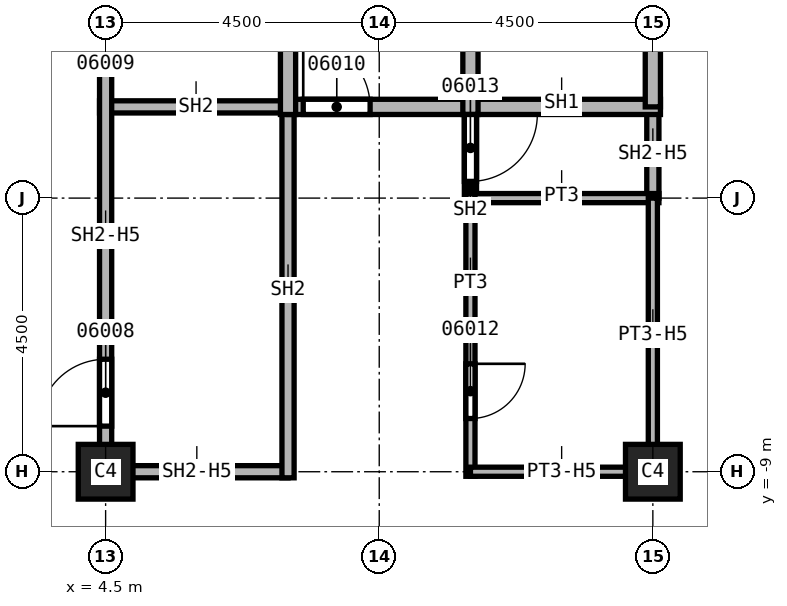
"""IFC4 building model, lengths in metres.
Left out: names, types, materials, properties, quantities, classifications, styles, units other than length and angle.
Written with IfcOpenShell. Run it as: python <this file> out.ifc"""

import sys

from ifc_helpers import new_model, si_unit, direction, frame, frame_2d, origin, origin_2d, place, context, subcontext, project, spatial, rectangle, extrude, element, fill, save


model = new_model("IFC4")
c1 = context("Model", 3, precision=1e-05, world=origin(), true_north=direction((0.0, 1.0)))
c2 = subcontext(c1, "Body", "Model", "MODEL_VIEW")
j1 = project(units=[si_unit("LENGTHUNIT", "METRE"), si_unit("PLANEANGLEUNIT", "RADIAN")], contexts=[c1])
p1 = place(None, origin())
s1 = spatial("IfcSite", under=j1, at=p1, CompositionType="ELEMENT")
p2 = place(p1, origin())
s2 = spatial("IfcBuilding", under=s1, at=p2, CompositionType="ELEMENT")
p3 = place(p2, frame((0.0, 0.0, 126.0)))
s3 = spatial("IfcBuildingStorey", under=s2, at=p3, CompositionType="ELEMENT", Elevation=126.0)
for number, where, z_axis, x_axis in (
    (1, (4.5, -9.0, 0.0), (0.0, 0.0, 1.0), (1.0, 0.0, 0.0)),
    (2, (13.5, -9.0, 0.0), (0.0, 0.0, 1.0), (1.0, 0.0, 0.0)),
):
    element("IfcColumn", number, at=place(p3, frame(where, z_axis=z_axis, x_axis=x_axis)), inside=s3, PredefinedType="COLUMN", context=c2, shape_type="SweptSolid", body=[
        extrude(rectangle(XDim=0.9, YDim=0.9, at=origin_2d()), origin(), (0.0, 0.0, 1.0), 3.7),
    ])
p4 = place(p3, frame((4.4, -3.0, 0.0), z_axis=(0.0, 0.0, 1.0), x_axis=(1.0, 0.0, 0.0)))
e3 = element("IfcWall", 3, at=p4, inside=s3, PredefinedType="SOLIDWALL", context=c2, shape_type="SweptSolid", body=[
    extrude(rectangle(XDim=3.225, YDim=0.2, at=frame_2d((1.613, 0.0))), origin(), (0.0, 0.0, 1.0), 3.7),
])
p5 = place(p3, frame((4.5, -9.1, 0.0), z_axis=(0.0, 0.0, 1.0), x_axis=(0.0, 1.0, 0.0)))
e4 = element("IfcWall", 4, at=p5, inside=s3, PredefinedType="SOLIDWALL", context=c2, shape_type="SweptSolid", body=[
    extrude(rectangle(XDim=9.1, YDim=0.2, at=frame_2d((4.55, 0.0))), origin(), (0.0, 0.0, 1.0), 2.938),
])
p6 = place(p5, frame((0.85, 0.0, 0.0)))
e5 = element("IfcOpeningElement", 5, at=p6, cuts=e4, PredefinedType="OPENING", context=c2, shape_type="SweptSolid", body=[
    extrude(rectangle(XDim=1.1, YDim=2.1, at=frame_2d((0.55, 1.05))), frame((0.0, 0.1, 0.0), z_axis=(0.0, -1.0, 0.0), x_axis=(1.0, 0.0, 0.0)), (0.0, 0.0, 1.0), 0.2),
])
p7 = place(p5, frame((7.25, 0.0, 0.0)))
e6 = element("IfcOpeningElement", 6, at=p7, cuts=e4, PredefinedType="OPENING", context=c2, shape_type="SweptSolid", body=[
    extrude(rectangle(XDim=1.1, YDim=2.1, at=frame_2d((0.55, 1.05))), frame((0.0, 0.1, 0.0), z_axis=(0.0, -1.0, 0.0), x_axis=(1.0, 0.0, 0.0)), (0.0, 0.0, 1.0), 0.2),
])
p8 = place(p3, frame((7.5, -9.0, 0.0), z_axis=(0.0, 0.0, 1.0), x_axis=(-1.0, 0.0, 0.0)))
e7 = element("IfcWall", 7, at=p8, inside=s3, PredefinedType="SOLIDWALL", context=c2, shape_type="SweptSolid", body=[
    extrude(rectangle(XDim=3.0, YDim=0.2, at=frame_2d((1.5, 0.0))), origin(), (0.0, 0.0, 1.0), 2.938),
])
p9 = place(p3, frame((7.5, -2.875, 0.0), z_axis=(0.0, 0.0, 1.0), x_axis=(0.0, -1.0, 0.0)))
e8 = element("IfcWall", 8, at=p9, inside=s3, PredefinedType="SOLIDWALL", context=c2, shape_type="SweptSolid", body=[
    extrude(rectangle(XDim=6.225, YDim=0.2, at=frame_2d((3.113, 0.0))), origin(), (0.0, 0.0, 1.0), 3.7),
])
p10 = place(p3, frame((10.5, -2.875, 0.0), z_axis=(0.0, 0.0, 1.0), x_axis=(0.0, -1.0, 0.0)))
e9 = element("IfcWall", 9, at=p10, inside=s3, PredefinedType="SOLIDWALL", context=c2, shape_type="SweptSolid", body=[
    extrude(rectangle(XDim=1.7, YDim=0.2, at=frame_2d((0.85, 0.0))), origin(), (0.0, 0.0, 1.0), 3.7),
])
p11 = place(p10, frame((0.25, 0.0, 0.0)))
e10 = element("IfcOpeningElement", 10, at=p11, cuts=e9, PredefinedType="OPENING", context=c2, shape_type="SweptSolid", body=[
    extrude(rectangle(XDim=1.1, YDim=2.1, at=frame_2d((0.55, 1.05))), frame((0.0, 0.1, 0.0), z_axis=(0.0, -1.0, 0.0), x_axis=(1.0, 0.0, 0.0)), (0.0, 0.0, 1.0), 0.2),
])
p12 = place(p3, frame((13.5, -3.0, 0.0), z_axis=(0.0, 0.0, 1.0), x_axis=(0.0, -1.0, 0.0)))
e11 = element("IfcWall", 11, at=p12, inside=s3, PredefinedType="SOLIDWALL", context=c2, shape_type="SweptSolid", body=[
    extrude(rectangle(XDim=1.5, YDim=0.2, at=frame_2d((0.75, 0.0))), origin(), (0.0, 0.0, 1.0), 2.938),
])
p13 = place(p3, frame((7.5, -3.0, 0.0), z_axis=(0.0, 0.0, 1.0), x_axis=(1.0, 0.0, 0.0)))
e12 = element("IfcWall", 12, at=p13, inside=s3, PredefinedType="SOLIDWALL", context=c2, shape_type="SweptSolid", body=[
    extrude(rectangle(XDim=6.125, YDim=0.25, at=frame_2d((3.062, 0.0))), origin(), (0.0, 0.0, 1.0), 3.7),
])
p14 = place(p13, frame((0.25, 0.0, 0.0)))
e13 = element("IfcOpeningElement", 13, at=p14, cuts=e12, PredefinedType="OPENING", context=c2, shape_type="SweptSolid", body=[
    extrude(rectangle(XDim=1.1, YDim=2.1, at=frame_2d((0.55, 1.05))), frame((0.0, 0.125, 0.0), z_axis=(0.0, -1.0, 0.0), x_axis=(1.0, 0.0, 0.0)), (0.0, 0.0, 1.0), 0.25),
])
p15 = place(p3, frame((7.5, 9.125, 0.0), z_axis=(0.0, 0.0, 1.0), x_axis=(0.0, -1.0, 0.0)))
e14 = element("IfcWall", 14, at=p15, inside=s3, PredefinedType="SOLIDWALL", context=c2, shape_type="SweptSolid", body=[
    extrude(rectangle(XDim=12.25, YDim=0.25, at=frame_2d((6.125, 0.0))), origin(), (0.0, 0.0, 1.0), 3.7),
])
p16 = place(p3, frame((10.5, 6.125, 0.0), z_axis=(0.0, 0.0, 1.0), x_axis=(0.0, -1.0, 0.0)))
e15 = element("IfcWall", 15, at=p16, inside=s3, PredefinedType="SOLIDWALL", context=c2, shape_type="SweptSolid", body=[
    extrude(rectangle(XDim=9.25, YDim=0.25, at=frame_2d((4.625, 0.0))), origin(), (0.0, 0.0, 1.0), 3.7),
])
p17 = place(p16, frame((7.075, 0.0, 0.0)))
e16 = element("IfcOpeningElement", 16, at=p17, cuts=e15, PredefinedType="OPENING", context=c2, shape_type="SweptSolid", body=[
    extrude(rectangle(XDim=1.1, YDim=2.1, at=frame_2d((0.55, 1.05))), frame((0.0, 0.125, 0.0), z_axis=(0.0, -1.0, 0.0), x_axis=(1.0, 0.0, 0.0)), (0.0, 0.0, 1.0), 0.25),
])
p18 = place(p16, frame((4.075, 0.0, 0.0)))
e17 = element("IfcOpeningElement", 17, at=p18, cuts=e15, PredefinedType="OPENING", context=c2, shape_type="SweptSolid", body=[
    extrude(rectangle(XDim=1.1, YDim=2.1, at=frame_2d((0.55, 1.05))), frame((0.0, 0.125, 0.0), z_axis=(0.0, -1.0, 0.0), x_axis=(1.0, 0.0, 0.0)), (0.0, 0.0, 1.0), 0.25),
])
p19 = place(p3, frame((13.5, 6.0, 0.0), z_axis=(0.0, 0.0, 1.0), x_axis=(0.0, -1.0, 0.0)))
e18 = element("IfcWall", 18, at=p19, inside=s3, PredefinedType="SOLIDWALL", context=c2, shape_type="SweptSolid", body=[
    extrude(rectangle(XDim=9.0, YDim=0.25, at=frame_2d((4.5, 0.0))), origin(), (0.0, 0.0, 1.0), 2.938),
])
p20 = place(p3, frame((10.5, -4.5, 0.0), z_axis=(0.0, 0.0, 1.0), x_axis=(1.0, 0.0, 0.0)))
e19 = element("IfcWall", 19, at=p20, inside=s3, PredefinedType="PARTITIONING", context=c2, shape_type="SweptSolid", body=[
    extrude(rectangle(XDim=3.1, YDim=0.15, at=frame_2d((1.55, 0.0))), origin(), (0.0, 0.0, 1.0), 3.7),
])
p21 = place(p3, frame((10.5, -4.425, 0.0), z_axis=(0.0, 0.0, 1.0), x_axis=(0.0, -1.0, 0.0)))
e20 = element("IfcWall", 20, at=p21, inside=s3, PredefinedType="PARTITIONING", context=c2, shape_type="SweptSolid", body=[
    extrude(rectangle(XDim=4.65, YDim=0.15, at=frame_2d((2.325, 0.0))), origin(), (0.0, 0.0, 1.0), 3.7),
])
p22 = place(p21, frame((2.8, 0.0, 0.0)))
e21 = element("IfcOpeningElement", 21, at=p22, cuts=e20, PredefinedType="OPENING", context=c2, shape_type="SweptSolid", body=[
    extrude(rectangle(XDim=0.9, YDim=2.1, at=frame_2d((0.45, 1.05))), frame((0.0, 0.075, 0.0), z_axis=(0.0, -1.0, 0.0), x_axis=(1.0, 0.0, 0.0)), (0.0, 0.0, 1.0), 0.15),
])
p23 = place(p3, frame((13.5, -9.0, 0.0), z_axis=(0.0, 0.0, 1.0), x_axis=(-1.0, 0.0, 0.0)))
e22 = element("IfcWall", 22, at=p23, inside=s3, PredefinedType="PARTITIONING", context=c2, shape_type="SweptSolid", body=[
    extrude(rectangle(XDim=3.0, YDim=0.15, at=frame_2d((1.5, 0.0))), origin(), (0.0, 0.0, 1.0), 2.938),
])
p24 = place(p3, frame((13.5, -4.5, 0.0), z_axis=(0.0, 0.0, 1.0), x_axis=(0.0, -1.0, 0.0)))
e23 = element("IfcWall", 23, at=p24, inside=s3, PredefinedType="PARTITIONING", context=c2, shape_type="SweptSolid", body=[
    extrude(rectangle(XDim=4.575, YDim=0.15, at=frame_2d((2.288, 0.0))), origin(), (0.0, 0.0, 1.0), 2.938),
])
p25 = place(p6, origin())
e24 = element("IfcDoor", 24, at=p25, inside=s3, OperationType="SINGLE_SWING_LEFT", PredefinedType="DOOR", context=c2, shape_type="SweptSolid", body=[
    extrude(rectangle(XDim=1.1, YDim=2.1, at=frame_2d((0.55, 1.05))), frame((0.0, 0.025, 0.0), z_axis=(0.0, -1.0, 0.0), x_axis=(1.0, 0.0, 0.0)), (0.0, 0.0, 1.0), 0.05),
])
fill(e5, e24)
p26 = place(p14, origin())
e25 = element("IfcDoor", 25, at=p26, inside=s3, OperationType="SINGLE_SWING_LEFT", PredefinedType="DOOR", context=c2, shape_type="SweptSolid", body=[
    extrude(rectangle(XDim=1.1, YDim=2.1, at=frame_2d((0.55, 1.05))), frame((0.0, 0.025, 0.0), z_axis=(0.0, -1.0, 0.0), x_axis=(1.0, 0.0, 0.0)), (0.0, 0.0, 1.0), 0.05),
])
fill(e13, e25)
p27 = place(p22, origin())
e26 = element("IfcDoor", 26, at=p27, inside=s3, OperationType="SINGLE_SWING_LEFT", PredefinedType="DOOR", context=c2, shape_type="SweptSolid", body=[
    extrude(rectangle(XDim=0.9, YDim=2.1, at=frame_2d((0.45, 1.05))), frame((0.0, 0.025, 0.0), z_axis=(0.0, -1.0, 0.0), x_axis=(1.0, 0.0, 0.0)), (0.0, 0.0, 1.0), 0.05),
])
fill(e21, e26)
p28 = place(p11, origin())
e27 = element("IfcDoor", 27, at=p28, inside=s3, OperationType="SINGLE_SWING_RIGHT", PredefinedType="DOOR", context=c2, shape_type="SweptSolid", body=[
    extrude(rectangle(XDim=1.1, YDim=2.1, at=frame_2d((0.55, 1.05))), frame((0.0, 0.025, 0.0), z_axis=(0.0, -1.0, 0.0), x_axis=(1.0, 0.0, 0.0)), (0.0, 0.0, 1.0), 0.05),
])
fill(e10, e27)
save(model, sys.argv[1])
